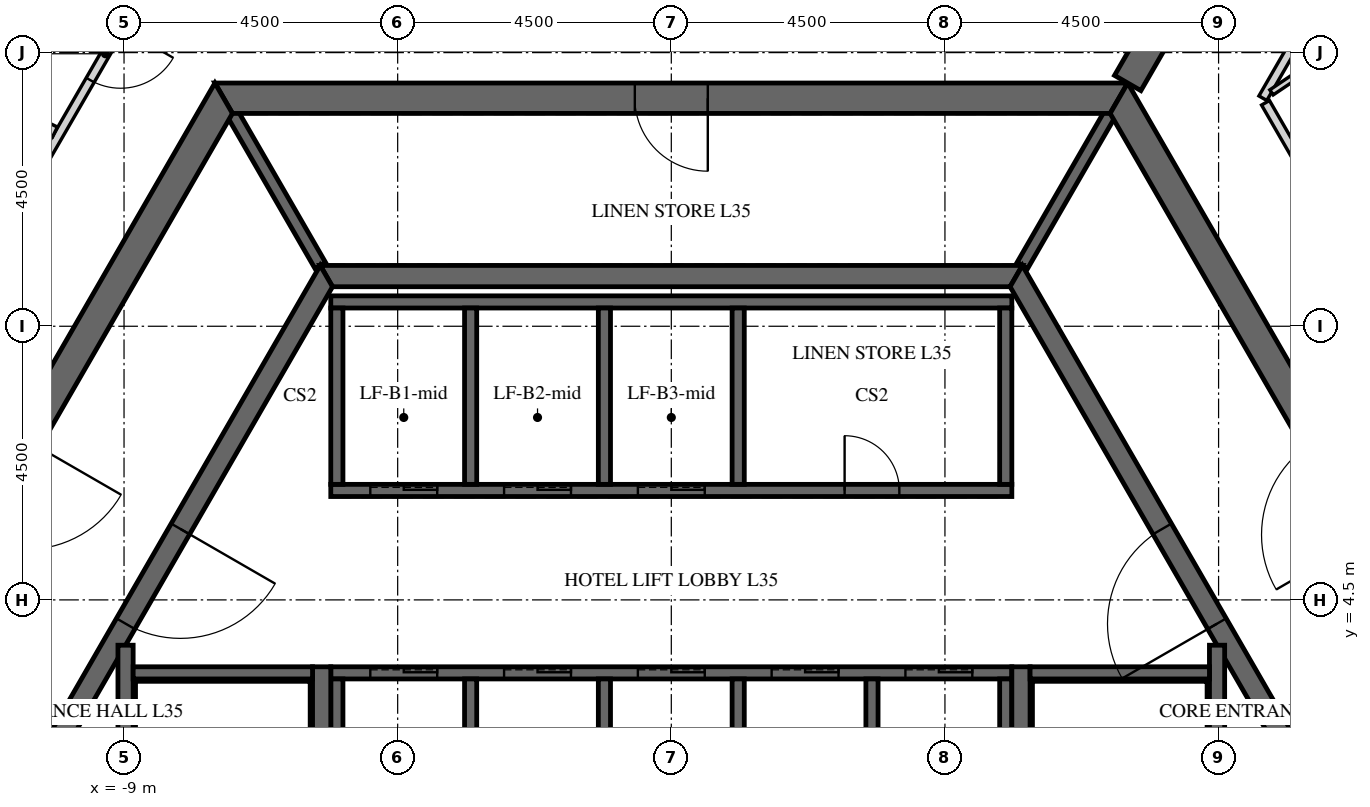
"""IFC4 building model, lengths in metres.
Left out: names, types, materials, properties, quantities, classifications, styles, units other than length and angle.
Written with IfcOpenShell. Run it as: python <this file> out.ifc"""

import sys

from ifc_helpers import new_model, si_unit, direction, frame, frame_2d, origin, place, context, subcontext, project, spatial, polyline, rectangle, outline, extrude, element, fill, save


model = new_model("IFC4")
c1 = context("Model", 3, precision=1e-05, world=origin(), true_north=direction((0.0, 1.0)))
c2 = subcontext(c1, "Body", "Model", "MODEL_VIEW")
j1 = project(units=[si_unit("LENGTHUNIT", "METRE"), si_unit("PLANEANGLEUNIT", "RADIAN")], contexts=[c1])
p1 = place(None, origin())
s1 = spatial("IfcSite", under=j1, at=p1, CompositionType="ELEMENT")
p2 = place(p1, origin())
s2 = spatial("IfcBuilding", under=s1, at=p2, CompositionType="ELEMENT")
p3 = place(p2, frame((0.0, 0.0, 152.7)))
s3 = spatial("IfcBuildingStorey", under=s2, at=p3, CompositionType="ELEMENT", Elevation=152.7)
p4 = place(p3, frame((-7.361, 12.75, 0.0), z_axis=(0.0, 0.0, 1.0), x_axis=(-0.50000571537, -0.866022103989, 0.0)))
e1 = element("IfcWall", 1, at=p4, inside=s3, PredefinedType="SHEAR", context=c2, shape_type="SweptSolid", body=[
    extrude(outline(polyline([(-0.144, -0.25), (14.867, -0.25), (14.578, 0.25), (0.144, 0.25), (-0.144, -0.25)])), origin(), (0.0, 0.0, 1.0), 3.75),
])
p5 = place(p4, frame((6.49, 0.0, 0.0)))
e2 = element("IfcOpeningElement", 2, at=p5, cuts=e1, PredefinedType="OPENING", context=c2, shape_type="SweptSolid", body=[
    extrude(rectangle(XDim=1.8, YDim=2.4, at=frame_2d((0.9, 1.2))), frame((0.0, 0.26, 0.0), z_axis=(0.0, -1.0, 0.0), x_axis=(1.0, 0.0, 0.0)), (0.0, 0.0, 1.0), 0.52),
])
p6 = place(p3, frame((14.722, 0.0, 0.0), z_axis=(0.0, 0.0, 1.0), x_axis=(-0.50000571537, 0.866022103989, 0.0)))
e3 = element("IfcWall", 3, at=p6, inside=s3, PredefinedType="SHEAR", context=c2, shape_type="SweptSolid", body=[
    extrude(outline(polyline([(-0.144, -0.25), (14.867, -0.25), (14.578, 0.25), (0.144, 0.25), (-0.144, -0.25)])), origin(), (0.0, 0.0, 1.0), 3.75),
])
p7 = place(p6, frame((6.432, 0.0, 0.0)))
e4 = element("IfcOpeningElement", 4, at=p7, cuts=e3, PredefinedType="OPENING", context=c2, shape_type="SweptSolid", body=[
    extrude(rectangle(XDim=1.8, YDim=2.4, at=frame_2d((0.9, 1.2))), frame((0.0, 0.26, 0.0), z_axis=(0.0, -1.0, 0.0), x_axis=(1.0, 0.0, 0.0)), (0.0, 0.0, 1.0), 0.52),
])
p8 = place(p3, frame((7.361, 12.75, 0.0), z_axis=(0.0, 0.0, 1.0), x_axis=(-1.0, 0.0, 0.0)))
e5 = element("IfcWall", 5, at=p8, inside=s3, PredefinedType="SHEAR", context=c2, shape_type="SweptSolid", body=[
    extrude(outline(polyline([(-0.144, -0.25), (14.866, -0.25), (14.578, 0.25), (0.144, 0.25), (-0.144, -0.25)])), origin(), (0.0, 0.0, 1.0), 3.75),
])
p9 = place(p8, frame((6.761, 0.0, 0.0)))
e6 = element("IfcOpeningElement", 6, at=p9, cuts=e5, PredefinedType="OPENING", context=c2, shape_type="SweptSolid", body=[
    extrude(rectangle(XDim=1.2, YDim=2.4, at=frame_2d((0.6, 1.2))), frame((0.0, 0.26, 0.0), z_axis=(0.0, -1.0, 0.0), x_axis=(1.0, 0.0, 0.0)), (0.0, 0.0, 1.0), 0.52),
])
p10 = place(p3, frame((7.506, 13.0, 0.0), z_axis=(0.0, 0.0, 1.0), x_axis=(0.499988271576, 0.866032175087, 0.0)))
e7 = element("IfcWall", 7, at=p10, inside=s3, PredefinedType="SHEAR", context=c2, shape_type="SweptSolid", body=[
    extrude(rectangle(XDim=15.424, YDim=0.5, at=frame_2d((7.712, 0.0))), origin(), (0.0, 0.0, 1.0), 3.75),
])
p11 = place(p10, frame((6.812, 0.0, 0.0)))
e8 = element("IfcOpeningElement", 8, at=p11, cuts=e7, PredefinedType="OPENING", context=c2, shape_type="SweptSolid", body=[
    extrude(rectangle(XDim=1.8, YDim=2.4, at=frame_2d((0.9, 1.2))), frame((0.0, 0.26, 0.0), z_axis=(0.0, -1.0, 0.0), x_axis=(1.0, 0.0, 0.0)), (0.0, 0.0, 1.0), 0.52),
])
p12 = place(p3, frame((-5.673, 9.825, 0.0), z_axis=(0.0, 0.0, 1.0), x_axis=(-0.499995046907, -0.866028263435, 0.0)))
e9 = element("IfcWall", 9, at=p12, inside=s3, PredefinedType="SHEAR", context=c2, shape_type="SweptSolid", body=[
    extrude(outline(polyline([(-0.101, -0.175), (11.446, -0.175), (11.244, 0.175), (0.101, 0.175), (-0.101, -0.175)])), origin(), (0.0, 0.0, 1.0), 3.75),
])
p13 = place(p12, frame((4.801, 0.0, 0.0)))
e10 = element("IfcOpeningElement", 10, at=p13, cuts=e9, PredefinedType="OPENING", context=c2, shape_type="SweptSolid", body=[
    extrude(rectangle(XDim=1.8, YDim=2.4, at=frame_2d((0.9, 1.2))), frame((0.0, 0.185, 0.0), z_axis=(0.0, -1.0, 0.0), x_axis=(1.0, 0.0, 0.0)), (0.0, 0.0, 1.0), 0.37),
])
p14 = place(p3, frame((11.345, 0.0, 0.0), z_axis=(0.0, 0.0, 1.0), x_axis=(-0.499995046907, 0.866028263435, 0.0)))
e11 = element("IfcWall", 11, at=p14, inside=s3, PredefinedType="SHEAR", context=c2, shape_type="SweptSolid", body=[
    extrude(outline(polyline([(-0.101, -0.175), (11.446, -0.175), (11.244, 0.175), (0.101, 0.175), (-0.101, -0.175)])), origin(), (0.0, 0.0, 1.0), 3.75),
])
p15 = place(p14, frame((4.744, 0.0, 0.0)))
e12 = element("IfcOpeningElement", 12, at=p15, cuts=e11, PredefinedType="OPENING", context=c2, shape_type="SweptSolid", body=[
    extrude(rectangle(XDim=1.8, YDim=2.4, at=frame_2d((0.9, 1.2))), frame((0.0, 0.185, 0.0), z_axis=(0.0, -1.0, 0.0), x_axis=(1.0, 0.0, 0.0)), (0.0, 0.0, 1.0), 0.37),
])
p16 = place(p3, frame((5.673, 9.825, 0.0), z_axis=(0.0, 0.0, 1.0), x_axis=(-1.0, 0.0, 0.0)))
e13 = element("IfcWall", 13, at=p16, inside=s3, PredefinedType="SHEAR", context=c2, shape_type="SweptSolid", body=[
    extrude(outline(polyline([(-0.101, -0.175), (11.446, -0.175), (11.244, 0.175), (0.101, 0.175), (-0.101, -0.175)])), origin(), (0.0, 0.0, 1.0), 3.75),
])
p17 = place(p3, frame((-5.6, 6.3, -0.5), z_axis=(0.0, 0.0, 1.0), x_axis=(1.0, 0.0, 0.0)))
e14 = element("IfcWall", 14, at=p17, inside=s3, PredefinedType="SHEAR", context=c2, shape_type="SweptSolid", body=[
    extrude(rectangle(XDim=11.2, YDim=0.2, at=frame_2d((5.6, 0.0))), origin(), (0.0, 0.0, 1.0), 4.15),
])
p18 = place(p17, frame((8.45, 0.0, 0.5)))
e15 = element("IfcOpeningElement", 15, at=p18, cuts=e14, PredefinedType="OPENING", context=c2, shape_type="SweptSolid", body=[
    extrude(rectangle(XDim=0.9, YDim=2.1, at=frame_2d((0.45, 1.05))), frame((0.0, 0.11, 0.0), z_axis=(0.0, -1.0, 0.0), x_axis=(1.0, 0.0, 0.0)), (0.0, 0.0, 1.0), 0.22),
])
p19 = place(p17, frame((0.65, 0.0, 0.5)))
e16 = element("IfcOpeningElement", 16, at=p19, cuts=e14, PredefinedType="OPENING", context=c2, shape_type="SweptSolid", body=[
    extrude(rectangle(XDim=1.1, YDim=2.1, at=frame_2d((0.55, 1.05))), frame((0.0, 0.11, 0.0), z_axis=(0.0, -1.0, 0.0), x_axis=(1.0, 0.0, 0.0)), (0.0, 0.0, 1.0), 0.22),
])
p20 = place(p17, frame((2.85, 0.0, 0.5)))
e17 = element("IfcOpeningElement", 17, at=p20, cuts=e14, PredefinedType="OPENING", context=c2, shape_type="SweptSolid", body=[
    extrude(rectangle(XDim=1.1, YDim=2.1, at=frame_2d((0.55, 1.05))), frame((0.0, 0.11, 0.0), z_axis=(0.0, -1.0, 0.0), x_axis=(1.0, 0.0, 0.0)), (0.0, 0.0, 1.0), 0.22),
])
p21 = place(p17, frame((5.05, 0.0, 0.5)))
e18 = element("IfcOpeningElement", 18, at=p21, cuts=e14, PredefinedType="OPENING", context=c2, shape_type="SweptSolid", body=[
    extrude(rectangle(XDim=1.1, YDim=2.1, at=frame_2d((0.55, 1.05))), frame((0.0, 0.11, 0.0), z_axis=(0.0, -1.0, 0.0), x_axis=(1.0, 0.0, 0.0)), (0.0, 0.0, 1.0), 0.22),
])
p22 = place(p3, frame((-5.6, 9.4, -0.5), z_axis=(0.0, 0.0, 1.0), x_axis=(1.0, 0.0, 0.0)))
e19 = element("IfcWall", 19, at=p22, inside=s3, PredefinedType="SHEAR", context=c2, shape_type="SweptSolid", body=[
    extrude(rectangle(XDim=11.2, YDim=0.2, at=frame_2d((5.6, 0.0))), origin(), (0.0, 0.0, 1.0), 4.15),
])
for number, where, z_axis, x_axis in (
    (20, (-5.5, 6.4, -0.5), (0.0, 0.0, 1.0), (0.0, 1.0, 0.0)),
    (21, (-3.3, 6.4, -0.5), (0.0, 0.0, 1.0), (0.0, 1.0, 0.0)),
    (22, (-1.1, 6.4, -0.5), (0.0, 0.0, 1.0), (0.0, 1.0, 0.0)),
    (23, (1.1, 6.4, -0.5), (0.0, 0.0, 1.0), (0.0, 1.0, 0.0)),
    (24, (5.5, 6.4, -0.5), (0.0, 0.0, 1.0), (0.0, 1.0, 0.0)),
):
    element("IfcWall", number, at=place(p3, frame(where, z_axis=z_axis, x_axis=x_axis)), inside=s3, PredefinedType="SHEAR", context=c2, shape_type="SweptSolid", body=[
        extrude(rectangle(XDim=2.9, YDim=0.2, at=frame_2d((1.45, 0.0))), origin(), (0.0, 0.0, 1.0), 4.15),
    ])
p23 = place(p3, frame((-5.6, 3.3, -0.5), z_axis=(0.0, 0.0, 1.0), x_axis=(1.0, 0.0, 0.0)))
e25 = element("IfcWall", 25, at=p23, inside=s3, PredefinedType="SHEAR", context=c2, shape_type="SweptSolid", body=[
    extrude(rectangle(XDim=11.2, YDim=0.2, at=frame_2d((5.6, 0.0))), origin(), (0.0, 0.0, 1.0), 4.15),
])
p24 = place(p23, frame((0.65, 0.0, 0.5)))
e26 = element("IfcOpeningElement", 26, at=p24, cuts=e25, PredefinedType="OPENING", context=c2, shape_type="SweptSolid", body=[
    extrude(rectangle(XDim=1.1, YDim=2.1, at=frame_2d((0.55, 1.05))), frame((0.0, 0.11, 0.0), z_axis=(0.0, -1.0, 0.0), x_axis=(1.0, 0.0, 0.0)), (0.0, 0.0, 1.0), 0.22),
])
p25 = place(p23, frame((2.85, 0.0, 0.5)))
e27 = element("IfcOpeningElement", 27, at=p25, cuts=e25, PredefinedType="OPENING", context=c2, shape_type="SweptSolid", body=[
    extrude(rectangle(XDim=1.1, YDim=2.1, at=frame_2d((0.55, 1.05))), frame((0.0, 0.11, 0.0), z_axis=(0.0, -1.0, 0.0), x_axis=(1.0, 0.0, 0.0)), (0.0, 0.0, 1.0), 0.22),
])
p26 = place(p23, frame((5.05, 0.0, 0.5)))
e28 = element("IfcOpeningElement", 28, at=p26, cuts=e25, PredefinedType="OPENING", context=c2, shape_type="SweptSolid", body=[
    extrude(rectangle(XDim=1.1, YDim=2.1, at=frame_2d((0.55, 1.05))), frame((0.0, 0.11, 0.0), z_axis=(0.0, -1.0, 0.0), x_axis=(1.0, 0.0, 0.0)), (0.0, 0.0, 1.0), 0.22),
])
p27 = place(p23, frame((7.25, 0.0, 0.5)))
e29 = element("IfcOpeningElement", 29, at=p27, cuts=e25, PredefinedType="OPENING", context=c2, shape_type="SweptSolid", body=[
    extrude(rectangle(XDim=1.1, YDim=2.1, at=frame_2d((0.55, 1.05))), frame((0.0, 0.11, 0.0), z_axis=(0.0, -1.0, 0.0), x_axis=(1.0, 0.0, 0.0)), (0.0, 0.0, 1.0), 0.22),
])
p28 = place(p23, frame((9.45, 0.0, 0.5)))
e30 = element("IfcOpeningElement", 30, at=p28, cuts=e25, PredefinedType="OPENING", context=c2, shape_type="SweptSolid", body=[
    extrude(rectangle(XDim=1.1, YDim=2.1, at=frame_2d((0.55, 1.05))), frame((0.0, 0.11, 0.0), z_axis=(0.0, -1.0, 0.0), x_axis=(1.0, 0.0, 0.0)), (0.0, 0.0, 1.0), 0.22),
])
for number, where, z_axis, x_axis in (
    (31, (-5.5, 0.1, -0.5), (0.0, 0.0, 1.0), (0.0, 1.0, 0.0)),
    (32, (-3.3, 0.1, -0.5), (0.0, 0.0, 1.0), (0.0, 1.0, 0.0)),
    (33, (-1.1, 0.1, -0.5), (0.0, 0.0, 1.0), (0.0, 1.0, 0.0)),
    (34, (1.1, 0.1, -0.5), (0.0, 0.0, 1.0), (0.0, 1.0, 0.0)),
    (35, (3.3, 0.1, -0.5), (0.0, 0.0, 1.0), (0.0, 1.0, 0.0)),
    (36, (5.5, 0.1, -0.5), (0.0, 0.0, 1.0), (0.0, 1.0, 0.0)),
):
    element("IfcWall", number, at=place(p3, frame(where, z_axis=z_axis, x_axis=x_axis)), inside=s3, PredefinedType="SHEAR", context=c2, shape_type="SweptSolid", body=[
        extrude(rectangle(XDim=3.1, YDim=0.2, at=frame_2d((1.55, 0.0))), origin(), (0.0, 0.0, 1.0), 4.15),
    ])
for number, where, z_axis, x_axis in (
    (37, (5.773, 10.0, 0.0), (0.0, 0.0, 1.0), (0.5, 0.866, 0.0)),
    (38, (-5.773, 10.0, 0.0), (0.0, 0.0, 1.0), (-0.5, 0.866, 0.0)),
):
    element("IfcWall", number, at=place(p3, frame(where, z_axis=z_axis, x_axis=x_axis)), inside=s3, PredefinedType="SHEAR", context=c2, shape_type="SweptSolid", body=[
        extrude(rectangle(XDim=2.887, YDim=0.2, at=frame_2d((1.443, 0.0))), origin(), (0.0, 0.0, 1.0), 3.75),
    ])
p29 = place(p3, frame((5.75, -3.4, -0.5), z_axis=(0.0, 0.0, 1.0), x_axis=(0.0, 1.0, 0.0)))
e39 = element("IfcWall", 39, at=p29, inside=s3, PredefinedType="SHEAR", context=c2, shape_type="SweptSolid", body=[
    extrude(rectangle(XDim=6.8, YDim=0.3, at=frame_2d((3.4, 0.0))), origin(), (0.0, 0.0, 1.0), 4.15),
])
p30 = place(p3, frame((8.975, -3.755, -0.5), z_axis=(0.0, 0.0, 1.0), x_axis=(0.0, 1.0, 0.0)))
e40 = element("IfcWall", 40, at=p30, inside=s3, PredefinedType="SHEAR", context=c2, shape_type="SweptSolid", body=[
    extrude(rectangle(XDim=7.51, YDim=0.25, at=frame_2d((3.755, 0.0))), origin(), (0.0, 0.0, 1.0), 4.15),
])
p31 = place(p3, frame((5.9, 3.3, -0.5), z_axis=(0.0, 0.0, 1.0), x_axis=(1.0, 0.0, 0.0)))
e41 = element("IfcWall", 41, at=p31, inside=s3, PredefinedType="SHEAR", context=c2, shape_type="SweptSolid", body=[
    extrude(rectangle(XDim=2.95, YDim=0.2, at=frame_2d((1.475, 0.0))), origin(), (0.0, 0.0, 1.0), 4.15),
])
p32 = place(p3, frame((-5.75, -3.4, -0.5), z_axis=(0.0, 0.0, 1.0), x_axis=(0.0, 1.0, 0.0)))
e42 = element("IfcWall", 42, at=p32, inside=s3, PredefinedType="SHEAR", context=c2, shape_type="SweptSolid", body=[
    extrude(rectangle(XDim=6.8, YDim=0.3, at=frame_2d((3.4, 0.0))), origin(), (0.0, 0.0, 1.0), 4.15),
])
p33 = place(p3, frame((-8.975, -3.755, -0.5), z_axis=(0.0, 0.0, 1.0), x_axis=(0.0, 1.0, 0.0)))
e43 = element("IfcWall", 43, at=p33, inside=s3, PredefinedType="SHEAR", context=c2, shape_type="SweptSolid", body=[
    extrude(rectangle(XDim=7.51, YDim=0.25, at=frame_2d((3.755, 0.0))), origin(), (0.0, 0.0, 1.0), 4.15),
])
p34 = place(p3, frame((-8.85, 3.3, -0.5), z_axis=(0.0, 0.0, 1.0), x_axis=(1.0, 0.0, 0.0)))
e44 = element("IfcWall", 44, at=p34, inside=s3, PredefinedType="SHEAR", context=c2, shape_type="SweptSolid", body=[
    extrude(rectangle(XDim=2.95, YDim=0.2, at=frame_2d((1.475, 0.0))), origin(), (0.0, 0.0, 1.0), 4.15),
])
p35 = place(p3, frame((-8.588, 14.725, 0.0), z_axis=(0.0, 0.0, 1.0), x_axis=(-0.499996322767, -0.866027526826, 0.0)))
e45 = element("IfcWall", 45, at=p35, inside=s3, PredefinedType="PARTITIONING", context=c2, shape_type="SweptSolid", body=[
    extrude(rectangle(XDim=14.636, YDim=0.15, at=frame_2d((7.318, 0.0))), origin(), (0.0, 0.0, 1.0), 2.823),
])
p36 = place(p35, frame((0.936, 0.0, 0.0)))
e46 = element("IfcOpeningElement", 46, at=p36, cuts=e45, PredefinedType="OPENING", context=c2, shape_type="SweptSolid", body=[
    extrude(rectangle(XDim=1.0, YDim=2.1, at=frame_2d((0.5, 1.05))), frame((0.0, 0.085, 0.0), z_axis=(0.0, -1.0, 0.0), x_axis=(1.0, 0.0, 0.0)), (0.0, 0.0, 1.0), 0.17),
])
p37 = place(p35, frame((9.495, 0.0, 0.0)))
e47 = element("IfcOpeningElement", 47, at=p37, cuts=e45, PredefinedType="OPENING", context=c2, shape_type="SweptSolid", body=[
    extrude(rectangle(XDim=1.0, YDim=2.1, at=frame_2d((0.5, 1.05))), frame((0.0, 0.085, 0.0), z_axis=(0.0, -1.0, 0.0), x_axis=(1.0, 0.0, 0.0)), (0.0, 0.0, 1.0), 0.17),
])
p38 = place(p3, frame((17.046, 0.075, 0.0), z_axis=(0.0, 0.0, 1.0), x_axis=(-0.499999403554, 0.866025748143, 0.0)))
e48 = element("IfcWall", 48, at=p38, inside=s3, PredefinedType="PARTITIONING", context=c2, shape_type="SweptSolid", body=[
    extrude(rectangle(XDim=14.549, YDim=0.15, at=frame_2d((7.275, 0.0))), origin(), (0.0, 0.0, 1.0), 2.823),
])
p39 = place(p38, frame((1.781, 0.0, 0.0)))
e49 = element("IfcOpeningElement", 49, at=p39, cuts=e48, PredefinedType="OPENING", context=c2, shape_type="SweptSolid", body=[
    extrude(rectangle(XDim=1.0, YDim=2.1, at=frame_2d((0.5, 1.05))), frame((0.0, 0.085, 0.0), z_axis=(0.0, -1.0, 0.0), x_axis=(1.0, 0.0, 0.0)), (0.0, 0.0, 1.0), 0.17),
])
p40 = place(p38, frame((8.705, 0.0, 0.0)))
e50 = element("IfcOpeningElement", 50, at=p40, cuts=e48, PredefinedType="OPENING", context=c2, shape_type="SweptSolid", body=[
    extrude(rectangle(XDim=1.0, YDim=2.1, at=frame_2d((0.5, 1.05))), frame((0.0, 0.085, 0.0), z_axis=(0.0, -1.0, 0.0), x_axis=(1.0, 0.0, 0.0)), (0.0, 0.0, 1.0), 0.17),
])
p41 = place(p3, frame((9.728, 12.75, 0.0), z_axis=(0.0, 0.0, 1.0), x_axis=(0.500007149838, 0.866021275784, 0.0)))
e51 = element("IfcWall", 51, at=p41, inside=s3, PredefinedType="PARTITIONING", context=c2, shape_type="SweptSolid", body=[
    extrude(rectangle(XDim=8.017, YDim=0.15, at=frame_2d((4.009, 0.0))), origin(), (0.0, 0.0, 1.0), 2.823),
])
p42 = place(p3, frame((-21.815, 17.892, 0.0), z_axis=(0.0, 0.0, 1.0), x_axis=(0.898798778742, -0.43836144371, 0.0)))
e52 = element("IfcWall", 52, at=p42, inside=s3, PredefinedType="PARTITIONING", context=c2, shape_type="SweptSolid", body=[
    extrude(rectangle(XDim=12.994, YDim=0.18, at=frame_2d((6.497, 0.0))), origin(), (0.0, 0.0, 1.0), 2.823),
])
p43 = place(p3, frame((9.87, 12.846, 0.0), z_axis=(0.0, 0.0, 1.0), x_axis=(0.829045266323, 0.559181496821, 0.0)))
e53 = element("IfcWall", 53, at=p43, inside=s3, PredefinedType="PARTITIONING", context=c2, shape_type="SweptSolid", body=[
    extrude(rectangle(XDim=2.548, YDim=0.1, at=frame_2d((1.274, 0.0))), origin(), (0.0, 0.0, 1.0), 2.823),
])
p44 = place(p9, origin())
e54 = element("IfcDoor", 54, at=p44, inside=s3, OperationType="SINGLE_SWING_LEFT", PredefinedType="DOOR", context=c2, shape_type="SweptSolid", body=[
    extrude(rectangle(XDim=1.2, YDim=2.4, at=frame_2d((0.6, 1.2))), frame((0.0, 0.025, 0.0), z_axis=(0.0, -1.0, 0.0), x_axis=(1.0, 0.0, 0.0)), (0.0, 0.0, 1.0), 0.05),
])
fill(e6, e54)
p45 = place(p13, origin())
e55 = element("IfcDoor", 55, at=p45, inside=s3, OperationType="DOUBLE_DOOR_SINGLE_SWING", PredefinedType="DOOR", context=c2, shape_type="SweptSolid", body=[
    extrude(rectangle(XDim=1.8, YDim=2.4, at=frame_2d((0.9, 1.2))), frame((0.0, 0.025, 0.0), z_axis=(0.0, -1.0, 0.0), x_axis=(1.0, 0.0, 0.0)), (0.0, 0.0, 1.0), 0.05),
])
fill(e10, e55)
p46 = place(p15, origin())
e56 = element("IfcDoor", 56, at=p46, inside=s3, OperationType="DOUBLE_DOOR_SINGLE_SWING", PredefinedType="DOOR", context=c2, shape_type="SweptSolid", body=[
    extrude(rectangle(XDim=1.8, YDim=2.4, at=frame_2d((0.9, 1.2))), frame((0.0, 0.025, 0.0), z_axis=(0.0, -1.0, 0.0), x_axis=(1.0, 0.0, 0.0)), (0.0, 0.0, 1.0), 0.05),
])
fill(e12, e56)
p47 = place(p18, origin())
e57 = element("IfcDoor", 57, at=p47, inside=s3, OperationType="SINGLE_SWING_LEFT", PredefinedType="DOOR", context=c2, shape_type="SweptSolid", body=[
    extrude(rectangle(XDim=0.9, YDim=2.1, at=frame_2d((0.45, 1.05))), frame((0.0, 0.025, 0.0), z_axis=(0.0, -1.0, 0.0), x_axis=(1.0, 0.0, 0.0)), (0.0, 0.0, 1.0), 0.05),
])
fill(e15, e57)
p48 = place(p19, origin())
e58 = element("IfcDoor", 58, at=p48, inside=s3, OperationType="SLIDING_TO_LEFT", PredefinedType="DOOR", context=c2, shape_type="SweptSolid", body=[
    extrude(rectangle(XDim=1.1, YDim=2.1, at=frame_2d((0.55, 1.05))), frame((0.0, 0.025, 0.0), z_axis=(0.0, -1.0, 0.0), x_axis=(1.0, 0.0, 0.0)), (0.0, 0.0, 1.0), 0.05),
])
fill(e16, e58)
p49 = place(p20, origin())
e59 = element("IfcDoor", 59, at=p49, inside=s3, OperationType="SLIDING_TO_LEFT", PredefinedType="DOOR", context=c2, shape_type="SweptSolid", body=[
    extrude(rectangle(XDim=1.1, YDim=2.1, at=frame_2d((0.55, 1.05))), frame((0.0, 0.025, 0.0), z_axis=(0.0, -1.0, 0.0), x_axis=(1.0, 0.0, 0.0)), (0.0, 0.0, 1.0), 0.05),
])
fill(e17, e59)
p50 = place(p21, origin())
e60 = element("IfcDoor", 60, at=p50, inside=s3, OperationType="SLIDING_TO_LEFT", PredefinedType="DOOR", context=c2, shape_type="SweptSolid", body=[
    extrude(rectangle(XDim=1.1, YDim=2.1, at=frame_2d((0.55, 1.05))), frame((0.0, 0.025, 0.0), z_axis=(0.0, -1.0, 0.0), x_axis=(1.0, 0.0, 0.0)), (0.0, 0.0, 1.0), 0.05),
])
fill(e18, e60)
p51 = place(p24, origin())
e61 = element("IfcDoor", 61, at=p51, inside=s3, OperationType="SLIDING_TO_LEFT", PredefinedType="DOOR", context=c2, shape_type="SweptSolid", body=[
    extrude(rectangle(XDim=1.1, YDim=2.1, at=frame_2d((0.55, 1.05))), frame((0.0, 0.025, 0.0), z_axis=(0.0, -1.0, 0.0), x_axis=(1.0, 0.0, 0.0)), (0.0, 0.0, 1.0), 0.05),
])
fill(e26, e61)
p52 = place(p25, origin())
e62 = element("IfcDoor", 62, at=p52, inside=s3, OperationType="SLIDING_TO_LEFT", PredefinedType="DOOR", context=c2, shape_type="SweptSolid", body=[
    extrude(rectangle(XDim=1.1, YDim=2.1, at=frame_2d((0.55, 1.05))), frame((0.0, 0.025, 0.0), z_axis=(0.0, -1.0, 0.0), x_axis=(1.0, 0.0, 0.0)), (0.0, 0.0, 1.0), 0.05),
])
fill(e27, e62)
p53 = place(p26, origin())
e63 = element("IfcDoor", 63, at=p53, inside=s3, OperationType="SLIDING_TO_LEFT", PredefinedType="DOOR", context=c2, shape_type="SweptSolid", body=[
    extrude(rectangle(XDim=1.1, YDim=2.1, at=frame_2d((0.55, 1.05))), frame((0.0, 0.025, 0.0), z_axis=(0.0, -1.0, 0.0), x_axis=(1.0, 0.0, 0.0)), (0.0, 0.0, 1.0), 0.05),
])
fill(e28, e63)
p54 = place(p27, origin())
e64 = element("IfcDoor", 64, at=p54, inside=s3, OperationType="SLIDING_TO_LEFT", PredefinedType="DOOR", context=c2, shape_type="SweptSolid", body=[
    extrude(rectangle(XDim=1.1, YDim=2.1, at=frame_2d((0.55, 1.05))), frame((0.0, 0.025, 0.0), z_axis=(0.0, -1.0, 0.0), x_axis=(1.0, 0.0, 0.0)), (0.0, 0.0, 1.0), 0.05),
])
fill(e29, e64)
p55 = place(p28, origin())
e65 = element("IfcDoor", 65, at=p55, inside=s3, OperationType="SLIDING_TO_LEFT", PredefinedType="DOOR", context=c2, shape_type="SweptSolid", body=[
    extrude(rectangle(XDim=1.1, YDim=2.1, at=frame_2d((0.55, 1.05))), frame((0.0, 0.025, 0.0), z_axis=(0.0, -1.0, 0.0), x_axis=(1.0, 0.0, 0.0)), (0.0, 0.0, 1.0), 0.05),
])
fill(e30, e65)
p56 = place(p36, origin())
e66 = element("IfcDoor", 66, at=p56, inside=s3, OperationType="SINGLE_SWING_RIGHT", PredefinedType="DOOR", context=c2, shape_type="SweptSolid", body=[
    extrude(rectangle(XDim=1.0, YDim=2.1, at=frame_2d((0.5, 1.05))), frame((0.0, 0.025, 0.0), z_axis=(0.0, -1.0, 0.0), x_axis=(1.0, 0.0, 0.0)), (0.0, 0.0, 1.0), 0.05),
])
fill(e46, e66)
save(model, sys.argv[1])
